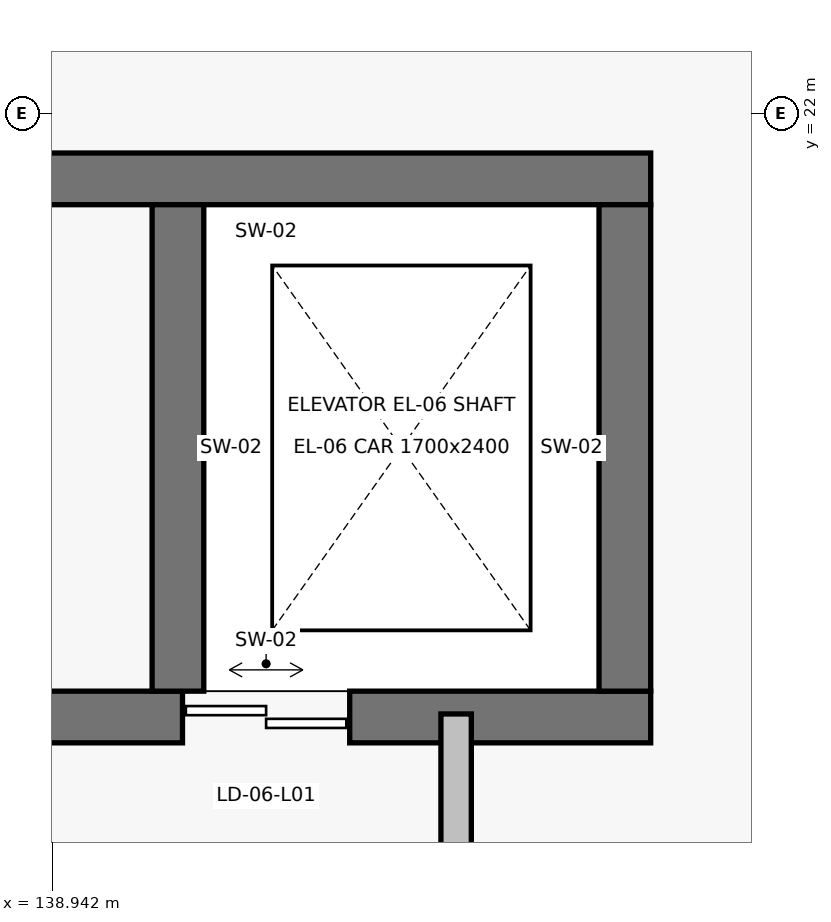
"""IFC4 building model, lengths in metres.
Left out: names, types, materials, properties, quantities, classifications, styles, units other than length and angle.
Written with IfcOpenShell. Run it as: python <this file> out.ifc"""

import sys

from ifc_helpers import new_model, si_unit, direction, frame, frame_2d, origin, place, context, subcontext, project, spatial, rectangle, extrude, element, fill, save


model = new_model("IFC4")
c1 = context("Model", 3, precision=1e-05, world=origin(), true_north=direction((0.0, 1.0)))
c2 = subcontext(c1, "Body", "Model", "MODEL_VIEW")
j1 = project(units=[si_unit("LENGTHUNIT", "METRE"), si_unit("PLANEANGLEUNIT", "RADIAN")], contexts=[c1])
p1 = place(None, origin())
s1 = spatial("IfcSite", under=j1, at=p1, CompositionType="ELEMENT")
p2 = place(p1, origin())
s2 = spatial("IfcBuilding", under=s1, at=p2, CompositionType="ELEMENT")
p3 = place(p2, origin())
s3 = spatial("IfcBuildingStorey", under=s2, at=p3, CompositionType="ELEMENT", Elevation=0.0)
p4 = place(p3, frame((137.82, 18.03, 0.0), z_axis=(0.0, 0.0, 1.0), x_axis=(1.0, 0.0, 0.0)))
e1 = element("IfcWall", 1, at=p4, inside=s3, PredefinedType="SHEAR", context=c2, shape_type="SweptSolid", body=[
    extrude(rectangle(XDim=5.06, YDim=0.34, at=frame_2d((2.53, 0.0))), origin(), (0.0, 0.0, 1.0), 6.32),
])
p5 = place(p4, frame((1.98, 0.0, 0.0)))
e2 = element("IfcOpeningElement", 2, at=p5, cuts=e1, PredefinedType="OPENING", context=c2, shape_type="SweptSolid", body=[
    extrude(rectangle(XDim=1.1, YDim=2.2, at=frame_2d((0.55, 1.1))), frame((0.0, 0.185, 0.0), z_axis=(0.0, -1.0, 0.0), x_axis=(1.0, 0.0, 0.0)), (0.0, 0.0, 1.0), 0.37),
])
p6 = place(p3, frame((142.88, 21.57, 0.0), z_axis=(0.0, 0.0, 1.0), x_axis=(-1.0, 0.0, 0.0)))
e3 = element("IfcWall", 3, at=p6, inside=s3, PredefinedType="SHEAR", context=c2, shape_type="SweptSolid", body=[
    extrude(rectangle(XDim=5.06, YDim=0.34, at=frame_2d((2.53, 0.0))), origin(), (0.0, 0.0, 1.0), 6.32),
])
for number, where, z_axis, x_axis in (
    (4, (139.77, 21.4, 0.0), (0.0, 0.0, 1.0), (0.0, -1.0, 0.0)),
    (5, (142.71, 18.2, 0.0), (0.0, 0.0, 1.0), (0.0, 1.0, 0.0)),
):
    element("IfcWall", number, at=place(p3, frame(where, z_axis=z_axis, x_axis=x_axis)), inside=s3, PredefinedType="SHEAR", context=c2, shape_type="SweptSolid", body=[
        extrude(rectangle(XDim=3.2, YDim=0.34, at=frame_2d((1.6, 0.0))), origin(), (0.0, 0.0, 1.0), 6.32),
    ])
p7 = place(p3, frame((141.6, 12.23, 0.0), z_axis=(0.0, 0.0, 1.0), x_axis=(0.0, 1.0, 0.0)))
e6 = element("IfcWall", 6, at=p7, inside=s3, PredefinedType="PARTITIONING", context=c2, shape_type="SweptSolid", body=[
    extrude(rectangle(XDim=5.82, YDim=0.2, at=frame_2d((2.91, 0.0))), origin(), (0.0, 0.0, 1.0), 5.89),
])
p8 = place(p7, frame((2.36, 0.0, 0.0)))
e7 = element("IfcOpeningElement", 7, at=p8, cuts=e6, PredefinedType="OPENING", context=c2, shape_type="SweptSolid", body=[
    extrude(rectangle(XDim=1.1, YDim=2.15, at=frame_2d((0.55, 1.075))), frame((0.0, 0.115, 0.0), z_axis=(0.0, -1.0, 0.0), x_axis=(1.0, 0.0, 0.0)), (0.0, 0.0, 1.0), 0.23),
])
p9 = place(p5, origin())
e8 = element("IfcDoor", 8, at=p9, inside=s3, OperationType="DOUBLE_DOOR_SLIDING", PredefinedType="DOOR", context=c2, shape_type="SweptSolid", body=[
    extrude(rectangle(XDim=1.1, YDim=2.2, at=frame_2d((0.55, 1.1))), frame((0.0, 0.025, 0.0), z_axis=(0.0, -1.0, 0.0), x_axis=(1.0, 0.0, 0.0)), (0.0, 0.0, 1.0), 0.05),
])
fill(e2, e8)
save(model, sys.argv[1])
